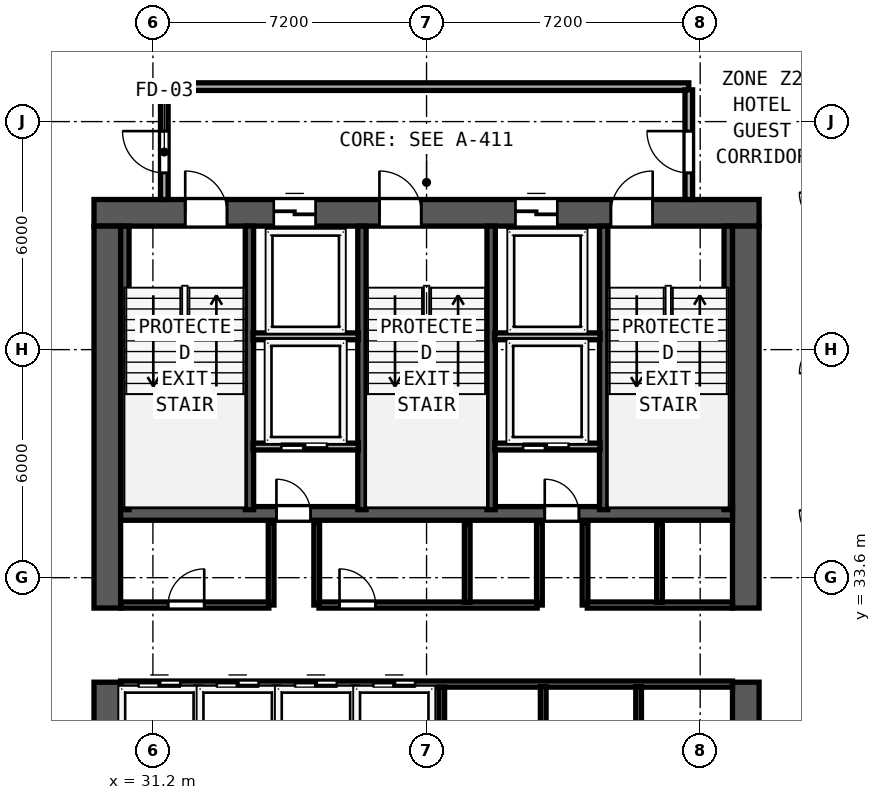
"""IFC4 building model, lengths in metres.
Left out: names, types, materials, properties, quantities, classifications, styles, units other than length and angle.
Written with IfcOpenShell. Run it as: python <this file> out.ifc"""

import sys

from ifc_helpers import new_model, si_unit, direction, frame, frame_2d, origin, place, context, subcontext, project, spatial, rectangle, extrude, element, fill, save


model = new_model("IFC4")
c1 = context("Model", 3, precision=1e-05, world=origin(), true_north=direction((0.0, 1.0)))
c2 = subcontext(c1, "Body", "Model", "MODEL_VIEW")
j1 = project(units=[si_unit("LENGTHUNIT", "METRE"), si_unit("PLANEANGLEUNIT", "RADIAN")], contexts=[c1])
p1 = place(None, origin())
s1 = spatial("IfcSite", under=j1, at=p1, CompositionType="ELEMENT")
p2 = place(p1, origin())
s2 = spatial("IfcBuilding", under=s1, at=p2, CompositionType="ELEMENT")
p3 = place(p2, frame((0.0, 0.0, 113.6)))
s3 = spatial("IfcBuildingStorey", under=s2, at=p3, CompositionType="ELEMENT", Elevation=113.6)
p4 = place(p3, frame((29.65, 43.2, 0.0), z_axis=(0.0, 0.0, 1.0), x_axis=(1.0, 0.0, 0.0)))
e1 = element("IfcWall", 1, at=p4, inside=s3, PredefinedType="SHEAR", context=c2, shape_type="SweptSolid", body=[
    extrude(rectangle(XDim=17.5, YDim=0.7, at=frame_2d((8.75, 0.0))), origin(), (0.0, 0.0, 1.0), 3.6),
])
p5 = place(p4, frame((2.4, 0.0, 0.0)))
e2 = element("IfcOpeningElement", 2, at=p5, cuts=e1, PredefinedType="OPENING", context=c2, shape_type="SweptSolid", body=[
    extrude(rectangle(XDim=1.1, YDim=2.15, at=frame_2d((0.55, 1.075))), frame((0.0, 0.36, 0.0), z_axis=(0.0, -1.0, 0.0), x_axis=(1.0, 0.0, 0.0)), (0.0, 0.0, 1.0), 0.72),
])
p6 = place(p4, frame((7.51, 0.0, 0.0)))
e3 = element("IfcOpeningElement", 3, at=p6, cuts=e1, PredefinedType="OPENING", context=c2, shape_type="SweptSolid", body=[
    extrude(rectangle(XDim=1.1, YDim=2.15, at=frame_2d((0.55, 1.075))), frame((0.0, 0.36, 0.0), z_axis=(0.0, -1.0, 0.0), x_axis=(1.0, 0.0, 0.0)), (0.0, 0.0, 1.0), 0.72),
])
p7 = place(p4, frame((13.6, 0.0, 0.0)))
e4 = element("IfcOpeningElement", 4, at=p7, cuts=e1, PredefinedType="OPENING", context=c2, shape_type="SweptSolid", body=[
    extrude(rectangle(XDim=1.1, YDim=2.15, at=frame_2d((0.55, 1.075))), frame((0.0, 0.36, 0.0), z_axis=(0.0, -1.0, 0.0), x_axis=(1.0, 0.0, 0.0)), (0.0, 0.0, 1.0), 0.72),
])
p8 = place(p4, frame((4.73, 0.0, 0.0)))
e5 = element("IfcOpeningElement", 5, at=p8, cuts=e1, PredefinedType="OPENING", context=c2, shape_type="SweptSolid", body=[
    extrude(rectangle(XDim=1.1, YDim=2.2, at=frame_2d((0.55, 1.1))), frame((0.0, 0.36, 0.0), z_axis=(0.0, -1.0, 0.0), x_axis=(1.0, 0.0, 0.0)), (0.0, 0.0, 1.0), 0.72),
])
p9 = place(p4, frame((11.09, 0.0, 0.0)))
e6 = element("IfcOpeningElement", 6, at=p9, cuts=e1, PredefinedType="OPENING", context=c2, shape_type="SweptSolid", body=[
    extrude(rectangle(XDim=1.1, YDim=2.2, at=frame_2d((0.55, 1.1))), frame((0.0, 0.36, 0.0), z_axis=(0.0, -1.0, 0.0), x_axis=(1.0, 0.0, 0.0)), (0.0, 0.0, 1.0), 0.72),
])
p10 = place(p3, frame((30.0, 26.75, 0.0), z_axis=(0.0, 0.0, 1.0), x_axis=(0.0, 1.0, 0.0)))
e7 = element("IfcWall", 7, at=p10, inside=s3, PredefinedType="SHEAR", context=c2, shape_type="SweptSolid", body=[
    extrude(rectangle(XDim=4.1, YDim=0.7, at=frame_2d((2.05, 0.0))), origin(), (0.0, 0.0, 1.0), 3.6),
])
p11 = place(p3, frame((30.0, 32.8, 0.0), z_axis=(0.0, 0.0, 1.0), x_axis=(0.0, 1.0, 0.0)))
e8 = element("IfcWall", 8, at=p11, inside=s3, PredefinedType="SHEAR", context=c2, shape_type="SweptSolid", body=[
    extrude(rectangle(XDim=10.05, YDim=0.7, at=frame_2d((5.025, 0.0))), origin(), (0.0, 0.0, 1.0), 3.6),
])
p12 = place(p3, frame((46.8, 26.75, 0.0), z_axis=(0.0, 0.0, 1.0), x_axis=(0.0, 1.0, 0.0)))
e9 = element("IfcWall", 9, at=p12, inside=s3, PredefinedType="SHEAR", context=c2, shape_type="SweptSolid", body=[
    extrude(rectangle(XDim=4.1, YDim=0.7, at=frame_2d((2.05, 0.0))), origin(), (0.0, 0.0, 1.0), 3.6),
])
p13 = place(p3, frame((46.8, 32.8, 0.0), z_axis=(0.0, 0.0, 1.0), x_axis=(0.0, 1.0, 0.0)))
e10 = element("IfcWall", 10, at=p13, inside=s3, PredefinedType="SHEAR", context=c2, shape_type="SweptSolid", body=[
    extrude(rectangle(XDim=10.05, YDim=0.7, at=frame_2d((5.025, 0.0))), origin(), (0.0, 0.0, 1.0), 3.6),
])
p14 = place(p3, frame((30.35, 35.29, 0.0), z_axis=(0.0, 0.0, 1.0), x_axis=(1.0, 0.0, 0.0)))
e11 = element("IfcWall", 11, at=p14, inside=s3, PredefinedType="SHEAR", context=c2, shape_type="SweptSolid", body=[
    extrude(rectangle(XDim=16.1, YDim=0.36, at=frame_2d((8.05, 0.0))), origin(), (0.0, 0.0, 1.0), 3.6),
])
p15 = place(p14, frame((5.0, 0.0, 0.0), z_axis=(0.0, 0.0, 1.0), x_axis=(-1.0, 0.0, 0.0)))
e12 = element("IfcOpeningElement", 12, at=p15, cuts=e11, PredefinedType="OPENING", context=c2, shape_type="SweptSolid", body=[
    extrude(rectangle(XDim=0.9, YDim=2.1, at=frame_2d((0.45, 1.05))), frame((0.0, 0.19, 0.0), z_axis=(0.0, -1.0, 0.0), x_axis=(1.0, 0.0, 0.0)), (0.0, 0.0, 1.0), 0.38),
])
p16 = place(p14, frame((12.06, 0.0, 0.0), z_axis=(0.0, 0.0, 1.0), x_axis=(-1.0, 0.0, 0.0)))
e13 = element("IfcOpeningElement", 13, at=p16, cuts=e11, PredefinedType="OPENING", context=c2, shape_type="SweptSolid", body=[
    extrude(rectangle(XDim=0.9, YDim=2.1, at=frame_2d((0.45, 1.05))), frame((0.0, 0.19, 0.0), z_axis=(0.0, -1.0, 0.0), x_axis=(1.0, 0.0, 0.0)), (0.0, 0.0, 1.0), 0.38),
])
for number, where, z_axis, x_axis in (
    (14, (30.462, 35.39, 0.0), (0.0, 0.0, 1.0), (0.0, 1.0, 0.0)),
    (15, (33.74, 35.39, 0.0), (0.0, 0.0, 1.0), (0.0, 1.0, 0.0)),
    (16, (36.7, 35.39, 0.0), (0.0, 0.0, 1.0), (0.0, 1.0, 0.0)),
    (17, (40.1, 35.39, 0.0), (0.0, 0.0, 1.0), (0.0, 1.0, 0.0)),
    (18, (43.06, 35.39, 0.0), (0.0, 0.0, 1.0), (0.0, 1.0, 0.0)),
    (19, (46.338, 35.39, 0.0), (0.0, 0.0, 1.0), (0.0, 1.0, 0.0)),
):
    element("IfcWall", number, at=place(p3, frame(where, z_axis=z_axis, x_axis=x_axis)), inside=s3, PredefinedType="SHEAR", context=c2, shape_type="SweptSolid", body=[
        extrude(rectangle(XDim=7.46, YDim=0.22, at=frame_2d((3.73, 0.0))), origin(), (0.0, 0.0, 1.0), 3.6),
    ])
p17 = place(p3, frame((31.5, 46.52, 0.0), z_axis=(0.0, 0.0, 1.0), x_axis=(1.0, 0.0, 0.0)))
e20 = element("IfcWall", 20, at=p17, inside=s3, PredefinedType="SOLIDWALL", context=c2, shape_type="SweptSolid", body=[
    extrude(rectangle(XDim=13.8, YDim=0.2, at=frame_2d((6.9, 0.0))), origin(), (0.0, 0.0, 1.0), 3.6),
])
p18 = place(p3, frame((31.5, 43.55, 0.0), z_axis=(0.0, 0.0, 1.0), x_axis=(0.0, 1.0, 0.0)))
e21 = element("IfcWall", 21, at=p18, inside=s3, PredefinedType="SOLIDWALL", context=c2, shape_type="SweptSolid", body=[
    extrude(rectangle(XDim=2.885, YDim=0.2, at=frame_2d((1.442, 0.0))), origin(), (0.0, 0.0, 1.0), 3.6),
])
p19 = place(p18, frame((1.8, 0.0, 0.0), z_axis=(0.0, 0.0, 1.0), x_axis=(-1.0, 0.0, 0.0)))
e22 = element("IfcOpeningElement", 22, at=p19, cuts=e21, PredefinedType="OPENING", context=c2, shape_type="SweptSolid", body=[
    extrude(rectangle(XDim=1.1, YDim=2.15, at=frame_2d((0.55, 1.075))), frame((0.0, 0.11, 0.0), z_axis=(0.0, -1.0, 0.0), x_axis=(1.0, 0.0, 0.0)), (0.0, 0.0, 1.0), 0.22),
])
p20 = place(p3, frame((45.3, 43.55, 0.0), z_axis=(0.0, 0.0, 1.0), x_axis=(0.0, 1.0, 0.0)))
e23 = element("IfcWall", 23, at=p20, inside=s3, PredefinedType="SOLIDWALL", context=c2, shape_type="SweptSolid", body=[
    extrude(rectangle(XDim=2.885, YDim=0.2, at=frame_2d((1.442, 0.0))), origin(), (0.0, 0.0, 1.0), 3.6),
])
p21 = place(p20, frame((0.7, 0.0, 0.0)))
e24 = element("IfcOpeningElement", 24, at=p21, cuts=e23, PredefinedType="OPENING", context=c2, shape_type="SweptSolid", body=[
    extrude(rectangle(XDim=1.1, YDim=2.15, at=frame_2d((0.55, 1.075))), frame((0.0, 0.11, 0.0), z_axis=(0.0, -1.0, 0.0), x_axis=(1.0, 0.0, 0.0)), (0.0, 0.0, 1.0), 0.22),
])
for number, where, z_axis, x_axis in (
    (25, (33.835, 39.95, 0.0), (0.0, 0.0, 1.0), (1.0, 0.0, 0.0)),
    (26, (40.195, 39.95, 0.0), (0.0, 0.0, 1.0), (1.0, 0.0, 0.0)),
):
    element("IfcWall", number, at=place(p3, frame(where, z_axis=z_axis, x_axis=x_axis)), inside=s3, PredefinedType="SOLIDWALL", context=c2, shape_type="SweptSolid", body=[
        extrude(rectangle(XDim=2.77, YDim=0.18, at=frame_2d((1.385, 0.0))), origin(), (0.0, 0.0, 1.0), 3.6),
    ])
p22 = place(p3, frame((33.835, 37.05, 0.0), z_axis=(0.0, 0.0, 1.0), x_axis=(1.0, 0.0, 0.0)))
e27 = element("IfcWall", 27, at=p22, inside=s3, PredefinedType="SOLIDWALL", context=c2, shape_type="SweptSolid", body=[
    extrude(rectangle(XDim=2.77, YDim=0.18, at=frame_2d((1.385, 0.0))), origin(), (0.0, 0.0, 1.0), 3.6),
])
p23 = place(p22, frame((1.945, 0.0, 0.0), z_axis=(0.0, 0.0, 1.0), x_axis=(-1.0, 0.0, 0.0)))
e28 = element("IfcOpeningElement", 28, at=p23, cuts=e27, PredefinedType="OPENING", context=c2, shape_type="SweptSolid", body=[
    extrude(rectangle(XDim=1.2, YDim=2.2, at=frame_2d((0.6, 1.1))), frame((0.0, 0.1, 0.0), z_axis=(0.0, -1.0, 0.0), x_axis=(1.0, 0.0, 0.0)), (0.0, 0.0, 1.0), 0.2),
])
for number, where, z_axis, x_axis in (
    (29, (34.31, 32.88, 0.0), (0.0, 0.0, 1.0), (0.0, 1.0, 0.0)),
    (30, (35.51, 32.88, 0.0), (0.0, 0.0, 1.0), (0.0, 1.0, 0.0)),
):
    element("IfcWall", number, at=place(p3, frame(where, z_axis=z_axis, x_axis=x_axis)), inside=s3, PredefinedType="SOLIDWALL", context=c2, shape_type="SweptSolid", body=[
        extrude(rectangle(XDim=2.17, YDim=0.15, at=frame_2d((1.085, 0.0))), origin(), (0.0, 0.0, 1.0), 3.6),
    ])
p24 = place(p3, frame((40.195, 37.05, 0.0), z_axis=(0.0, 0.0, 1.0), x_axis=(1.0, 0.0, 0.0)))
e31 = element("IfcWall", 31, at=p24, inside=s3, PredefinedType="SOLIDWALL", context=c2, shape_type="SweptSolid", body=[
    extrude(rectangle(XDim=2.77, YDim=0.18, at=frame_2d((1.385, 0.0))), origin(), (0.0, 0.0, 1.0), 3.6),
])
p25 = place(p24, frame((1.945, 0.0, 0.0), z_axis=(0.0, 0.0, 1.0), x_axis=(-1.0, 0.0, 0.0)))
e32 = element("IfcOpeningElement", 32, at=p25, cuts=e31, PredefinedType="OPENING", context=c2, shape_type="SweptSolid", body=[
    extrude(rectangle(XDim=1.2, YDim=2.2, at=frame_2d((0.6, 1.1))), frame((0.0, 0.1, 0.0), z_axis=(0.0, -1.0, 0.0), x_axis=(1.0, 0.0, 0.0)), (0.0, 0.0, 1.0), 0.2),
])
for number, where, z_axis, x_axis in (
    (33, (41.37, 32.88, 0.0), (0.0, 0.0, 1.0), (0.0, 1.0, 0.0)),
    (34, (42.57, 32.88, 0.0), (0.0, 0.0, 1.0), (0.0, 1.0, 0.0)),
):
    element("IfcWall", number, at=place(p3, frame(where, z_axis=z_axis, x_axis=x_axis)), inside=s3, PredefinedType="SOLIDWALL", context=c2, shape_type="SweptSolid", body=[
        extrude(rectangle(XDim=2.17, YDim=0.15, at=frame_2d((1.085, 0.0))), origin(), (0.0, 0.0, 1.0), 3.6),
    ])
p26 = place(p3, frame((30.35, 32.88, 0.0), z_axis=(0.0, 0.0, 1.0), x_axis=(1.0, 0.0, 0.0)))
e35 = element("IfcWall", 35, at=p26, inside=s3, PredefinedType="SOLIDWALL", context=c2, shape_type="SweptSolid", body=[
    extrude(rectangle(XDim=3.9, YDim=0.16, at=frame_2d((1.95, 0.0))), origin(), (0.0, 0.0, 1.0), 3.6),
])
p27 = place(p26, frame((2.2, 0.0, 0.0), z_axis=(0.0, 0.0, 1.0), x_axis=(-1.0, 0.0, 0.0)))
e36 = element("IfcOpeningElement", 36, at=p27, cuts=e35, PredefinedType="OPENING", context=c2, shape_type="SweptSolid", body=[
    extrude(rectangle(XDim=0.95, YDim=2.12, at=frame_2d((0.475, 1.06))), frame((0.0, 0.09, 0.0), z_axis=(0.0, -1.0, 0.0), x_axis=(1.0, 0.0, 0.0)), (0.0, 0.0, 1.0), 0.18),
])
p28 = place(p3, frame((35.57, 32.88, 0.0), z_axis=(0.0, 0.0, 1.0), x_axis=(1.0, 0.0, 0.0)))
e37 = element("IfcWall", 37, at=p28, inside=s3, PredefinedType="SOLIDWALL", context=c2, shape_type="SweptSolid", body=[
    extrude(rectangle(XDim=5.74, YDim=0.16, at=frame_2d((2.87, 0.0))), origin(), (0.0, 0.0, 1.0), 3.6),
])
p29 = place(p28, frame((1.49, 0.0, 0.0), z_axis=(0.0, 0.0, 1.0), x_axis=(-1.0, 0.0, 0.0)))
e38 = element("IfcOpeningElement", 38, at=p29, cuts=e37, PredefinedType="OPENING", context=c2, shape_type="SweptSolid", body=[
    extrude(rectangle(XDim=0.95, YDim=2.12, at=frame_2d((0.475, 1.06))), frame((0.0, 0.09, 0.0), z_axis=(0.0, -1.0, 0.0), x_axis=(1.0, 0.0, 0.0)), (0.0, 0.0, 1.0), 0.18),
])
p30 = place(p3, frame((42.63, 32.88, 0.0), z_axis=(0.0, 0.0, 1.0), x_axis=(1.0, 0.0, 0.0)))
e39 = element("IfcWall", 39, at=p30, inside=s3, PredefinedType="SOLIDWALL", context=c2, shape_type="SweptSolid", body=[
    extrude(rectangle(XDim=3.82, YDim=0.16, at=frame_2d((1.91, 0.0))), origin(), (0.0, 0.0, 1.0), 3.6),
])
for number, where, z_axis, x_axis in (
    (40, (39.47, 32.95, 0.0), (0.0, 0.0, 1.0), (0.0, 1.0, 0.0)),
    (41, (44.53, 32.95, 0.0), (0.0, 0.0, 1.0), (0.0, 1.0, 0.0)),
):
    element("IfcWall", number, at=place(p3, frame(where, z_axis=z_axis, x_axis=x_axis)), inside=s3, PredefinedType="SOLIDWALL", context=c2, shape_type="SweptSolid", body=[
        extrude(rectangle(XDim=2.05, YDim=0.15, at=frame_2d((1.025, 0.0))), origin(), (0.0, 0.0, 1.0), 3.6),
    ])
p31 = place(p3, frame((30.35, 30.8, 0.0), z_axis=(0.0, 0.0, 1.0), x_axis=(1.0, 0.0, 0.0)))
e42 = element("IfcWall", 42, at=p31, inside=s3, PredefinedType="SOLIDWALL", context=c2, shape_type="SweptSolid", body=[
    extrude(rectangle(XDim=16.1, YDim=0.16, at=frame_2d((8.05, 0.0))), origin(), (0.0, 0.0, 1.0), 3.6),
])
p32 = place(p31, frame((0.47, 0.0, 0.0)))
e43 = element("IfcOpeningElement", 43, at=p32, cuts=e42, PredefinedType="OPENING", context=c2, shape_type="SweptSolid", body=[
    extrude(rectangle(XDim=1.1, YDim=2.2, at=frame_2d((0.55, 1.1))), frame((0.0, 0.09, 0.0), z_axis=(0.0, -1.0, 0.0), x_axis=(1.0, 0.0, 0.0)), (0.0, 0.0, 1.0), 0.18),
])
p33 = place(p31, frame((2.53, 0.0, 0.0)))
e44 = element("IfcOpeningElement", 44, at=p33, cuts=e42, PredefinedType="OPENING", context=c2, shape_type="SweptSolid", body=[
    extrude(rectangle(XDim=1.1, YDim=2.2, at=frame_2d((0.55, 1.1))), frame((0.0, 0.09, 0.0), z_axis=(0.0, -1.0, 0.0), x_axis=(1.0, 0.0, 0.0)), (0.0, 0.0, 1.0), 0.18),
])
p34 = place(p31, frame((4.59, 0.0, 0.0)))
e45 = element("IfcOpeningElement", 45, at=p34, cuts=e42, PredefinedType="OPENING", context=c2, shape_type="SweptSolid", body=[
    extrude(rectangle(XDim=1.1, YDim=2.2, at=frame_2d((0.55, 1.1))), frame((0.0, 0.09, 0.0), z_axis=(0.0, -1.0, 0.0), x_axis=(1.0, 0.0, 0.0)), (0.0, 0.0, 1.0), 0.18),
])
p35 = place(p31, frame((6.65, 0.0, 0.0)))
e46 = element("IfcOpeningElement", 46, at=p35, cuts=e42, PredefinedType="OPENING", context=c2, shape_type="SweptSolid", body=[
    extrude(rectangle(XDim=1.1, YDim=2.2, at=frame_2d((0.55, 1.1))), frame((0.0, 0.09, 0.0), z_axis=(0.0, -1.0, 0.0), x_axis=(1.0, 0.0, 0.0)), (0.0, 0.0, 1.0), 0.18),
])
for number, where, z_axis, x_axis in (
    (47, (32.4, 28.735, 0.0), (0.0, 0.0, 1.0), (0.0, 1.0, 0.0)),
    (48, (34.46, 28.735, 0.0), (0.0, 0.0, 1.0), (0.0, 1.0, 0.0)),
    (49, (36.52, 28.735, 0.0), (0.0, 0.0, 1.0), (0.0, 1.0, 0.0)),
    (50, (38.8, 28.735, 0.0), (0.0, 0.0, 1.0), (0.0, 1.0, 0.0)),
):
    element("IfcWall", number, at=place(p3, frame(where, z_axis=z_axis, x_axis=x_axis)), inside=s3, PredefinedType="SOLIDWALL", context=c2, shape_type="SweptSolid", body=[
        extrude(rectangle(XDim=1.985, YDim=0.15, at=frame_2d((0.992, 0.0))), origin(), (0.0, 0.0, 1.0), 3.6),
    ])
for number, where, z_axis, x_axis in (
    (51, (41.47, 28.75, 0.0), (0.0, 0.0, 1.0), (0.0, 1.0, 0.0)),
    (52, (43.98, 28.75, 0.0), (0.0, 0.0, 1.0), (0.0, 1.0, 0.0)),
):
    element("IfcWall", number, at=place(p3, frame(where, z_axis=z_axis, x_axis=x_axis)), inside=s3, PredefinedType="SOLIDWALL", context=c2, shape_type="SweptSolid", body=[
        extrude(rectangle(XDim=1.985, YDim=0.15, at=frame_2d((0.993, 0.0))), origin(), (0.0, 0.0, 1.0), 3.6),
    ])
p36 = place(p5, origin())
e53 = element("IfcDoor", 53, at=p36, inside=s3, OperationType="SINGLE_SWING_LEFT", PredefinedType="DOOR", context=c2, shape_type="SweptSolid", body=[
    extrude(rectangle(XDim=1.1, YDim=2.15, at=frame_2d((0.55, 1.075))), frame((0.0, 0.185, 0.0), z_axis=(0.0, -1.0, 0.0), x_axis=(1.0, 0.0, 0.0)), (0.0, 0.0, 1.0), 0.05),
])
fill(e2, e53)
p37 = place(p6, origin())
e54 = element("IfcDoor", 54, at=p37, inside=s3, OperationType="SINGLE_SWING_LEFT", PredefinedType="DOOR", context=c2, shape_type="SweptSolid", body=[
    extrude(rectangle(XDim=1.1, YDim=2.15, at=frame_2d((0.55, 1.075))), frame((0.0, 0.185, 0.0), z_axis=(0.0, -1.0, 0.0), x_axis=(1.0, 0.0, 0.0)), (0.0, 0.0, 1.0), 0.05),
])
fill(e3, e54)
p38 = place(p7, origin())
e55 = element("IfcDoor", 55, at=p38, inside=s3, OperationType="SINGLE_SWING_RIGHT", PredefinedType="DOOR", context=c2, shape_type="SweptSolid", body=[
    extrude(rectangle(XDim=1.1, YDim=2.15, at=frame_2d((0.55, 1.075))), frame((0.0, 0.185, 0.0), z_axis=(0.0, -1.0, 0.0), x_axis=(1.0, 0.0, 0.0)), (0.0, 0.0, 1.0), 0.05),
])
fill(e4, e55)
p39 = place(p19, origin())
e56 = element("IfcDoor", 56, at=p39, inside=s3, OperationType="SINGLE_SWING_LEFT", PredefinedType="DOOR", context=c2, shape_type="SweptSolid", body=[
    extrude(rectangle(XDim=1.1, YDim=2.15, at=frame_2d((0.55, 1.075))), frame((0.0, 0.025, 0.0), z_axis=(0.0, -1.0, 0.0), x_axis=(1.0, 0.0, 0.0)), (0.0, 0.0, 1.0), 0.05),
])
fill(e22, e56)
p40 = place(p21, origin())
e57 = element("IfcDoor", 57, at=p40, inside=s3, OperationType="SINGLE_SWING_RIGHT", PredefinedType="DOOR", context=c2, shape_type="SweptSolid", body=[
    extrude(rectangle(XDim=1.1, YDim=2.15, at=frame_2d((0.55, 1.075))), frame((0.0, 0.025, 0.0), z_axis=(0.0, -1.0, 0.0), x_axis=(1.0, 0.0, 0.0)), (0.0, 0.0, 1.0), 0.05),
])
fill(e24, e57)
p41 = place(p8, origin())
e58 = element("IfcDoor", 58, at=p41, inside=s3, OperationType="SLIDING_TO_LEFT", PredefinedType="DOOR", context=c2, shape_type="SweptSolid", body=[
    extrude(rectangle(XDim=1.1, YDim=2.2, at=frame_2d((0.55, 1.1))), frame((0.0, 0.185, 0.0), z_axis=(0.0, -1.0, 0.0), x_axis=(1.0, 0.0, 0.0)), (0.0, 0.0, 1.0), 0.05),
])
fill(e5, e58)
p42 = place(p9, origin())
e59 = element("IfcDoor", 59, at=p42, inside=s3, OperationType="SLIDING_TO_LEFT", PredefinedType="DOOR", context=c2, shape_type="SweptSolid", body=[
    extrude(rectangle(XDim=1.1, YDim=2.2, at=frame_2d((0.55, 1.1))), frame((0.0, 0.185, 0.0), z_axis=(0.0, -1.0, 0.0), x_axis=(1.0, 0.0, 0.0)), (0.0, 0.0, 1.0), 0.05),
])
fill(e6, e59)
p43 = place(p23, origin())
e60 = element("IfcDoor", 60, at=p43, inside=s3, OperationType="SLIDING_TO_RIGHT", PredefinedType="DOOR", context=c2, shape_type="SweptSolid", body=[
    extrude(rectangle(XDim=1.2, YDim=2.2, at=frame_2d((0.6, 1.1))), frame((0.0, 0.025, 0.0), z_axis=(0.0, -1.0, 0.0), x_axis=(1.0, 0.0, 0.0)), (0.0, 0.0, 1.0), 0.05),
])
fill(e28, e60)
p44 = place(p15, origin())
e61 = element("IfcDoor", 61, at=p44, inside=s3, OperationType="SINGLE_SWING_RIGHT", PredefinedType="DOOR", context=c2, shape_type="SweptSolid", body=[
    extrude(rectangle(XDim=0.9, YDim=2.1, at=frame_2d((0.45, 1.05))), frame((0.0, 0.025, 0.0), z_axis=(0.0, -1.0, 0.0), x_axis=(1.0, 0.0, 0.0)), (0.0, 0.0, 1.0), 0.05),
])
fill(e12, e61)
p45 = place(p25, origin())
e62 = element("IfcDoor", 62, at=p45, inside=s3, OperationType="SLIDING_TO_RIGHT", PredefinedType="DOOR", context=c2, shape_type="SweptSolid", body=[
    extrude(rectangle(XDim=1.2, YDim=2.2, at=frame_2d((0.6, 1.1))), frame((0.0, 0.025, 0.0), z_axis=(0.0, -1.0, 0.0), x_axis=(1.0, 0.0, 0.0)), (0.0, 0.0, 1.0), 0.05),
])
fill(e32, e62)
p46 = place(p16, origin())
e63 = element("IfcDoor", 63, at=p46, inside=s3, OperationType="SINGLE_SWING_RIGHT", PredefinedType="DOOR", context=c2, shape_type="SweptSolid", body=[
    extrude(rectangle(XDim=0.9, YDim=2.1, at=frame_2d((0.45, 1.05))), frame((0.0, 0.025, 0.0), z_axis=(0.0, -1.0, 0.0), x_axis=(1.0, 0.0, 0.0)), (0.0, 0.0, 1.0), 0.05),
])
fill(e13, e63)
p47 = place(p27, origin())
e64 = element("IfcDoor", 64, at=p47, inside=s3, OperationType="SINGLE_SWING_LEFT", PredefinedType="DOOR", context=c2, shape_type="SweptSolid", body=[
    extrude(rectangle(XDim=0.95, YDim=2.12, at=frame_2d((0.475, 1.06))), frame((0.0, 0.025, 0.0), z_axis=(0.0, -1.0, 0.0), x_axis=(1.0, 0.0, 0.0)), (0.0, 0.0, 1.0), 0.05),
])
fill(e36, e64)
p48 = place(p29, origin())
e65 = element("IfcDoor", 65, at=p48, inside=s3, OperationType="SINGLE_SWING_RIGHT", PredefinedType="DOOR", context=c2, shape_type="SweptSolid", body=[
    extrude(rectangle(XDim=0.95, YDim=2.12, at=frame_2d((0.475, 1.06))), frame((0.0, 0.025, 0.0), z_axis=(0.0, -1.0, 0.0), x_axis=(1.0, 0.0, 0.0)), (0.0, 0.0, 1.0), 0.05),
])
fill(e38, e65)
p49 = place(p32, origin())
e66 = element("IfcDoor", 66, at=p49, inside=s3, OperationType="SLIDING_TO_LEFT", PredefinedType="DOOR", context=c2, shape_type="SweptSolid", body=[
    extrude(rectangle(XDim=1.1, YDim=2.2, at=frame_2d((0.55, 1.1))), frame((0.0, 0.025, 0.0), z_axis=(0.0, -1.0, 0.0), x_axis=(1.0, 0.0, 0.0)), (0.0, 0.0, 1.0), 0.05),
])
fill(e43, e66)
p50 = place(p33, origin())
e67 = element("IfcDoor", 67, at=p50, inside=s3, OperationType="SLIDING_TO_LEFT", PredefinedType="DOOR", context=c2, shape_type="SweptSolid", body=[
    extrude(rectangle(XDim=1.1, YDim=2.2, at=frame_2d((0.55, 1.1))), frame((0.0, 0.025, 0.0), z_axis=(0.0, -1.0, 0.0), x_axis=(1.0, 0.0, 0.0)), (0.0, 0.0, 1.0), 0.05),
])
fill(e44, e67)
p51 = place(p34, origin())
e68 = element("IfcDoor", 68, at=p51, inside=s3, OperationType="SLIDING_TO_LEFT", PredefinedType="DOOR", context=c2, shape_type="SweptSolid", body=[
    extrude(rectangle(XDim=1.1, YDim=2.2, at=frame_2d((0.55, 1.1))), frame((0.0, 0.025, 0.0), z_axis=(0.0, -1.0, 0.0), x_axis=(1.0, 0.0, 0.0)), (0.0, 0.0, 1.0), 0.05),
])
fill(e45, e68)
p52 = place(p35, origin())
e69 = element("IfcDoor", 69, at=p52, inside=s3, OperationType="SLIDING_TO_LEFT", PredefinedType="DOOR", context=c2, shape_type="SweptSolid", body=[
    extrude(rectangle(XDim=1.1, YDim=2.2, at=frame_2d((0.55, 1.1))), frame((0.0, 0.025, 0.0), z_axis=(0.0, -1.0, 0.0), x_axis=(1.0, 0.0, 0.0)), (0.0, 0.0, 1.0), 0.05),
])
fill(e46, e69)
save(model, sys.argv[1])
